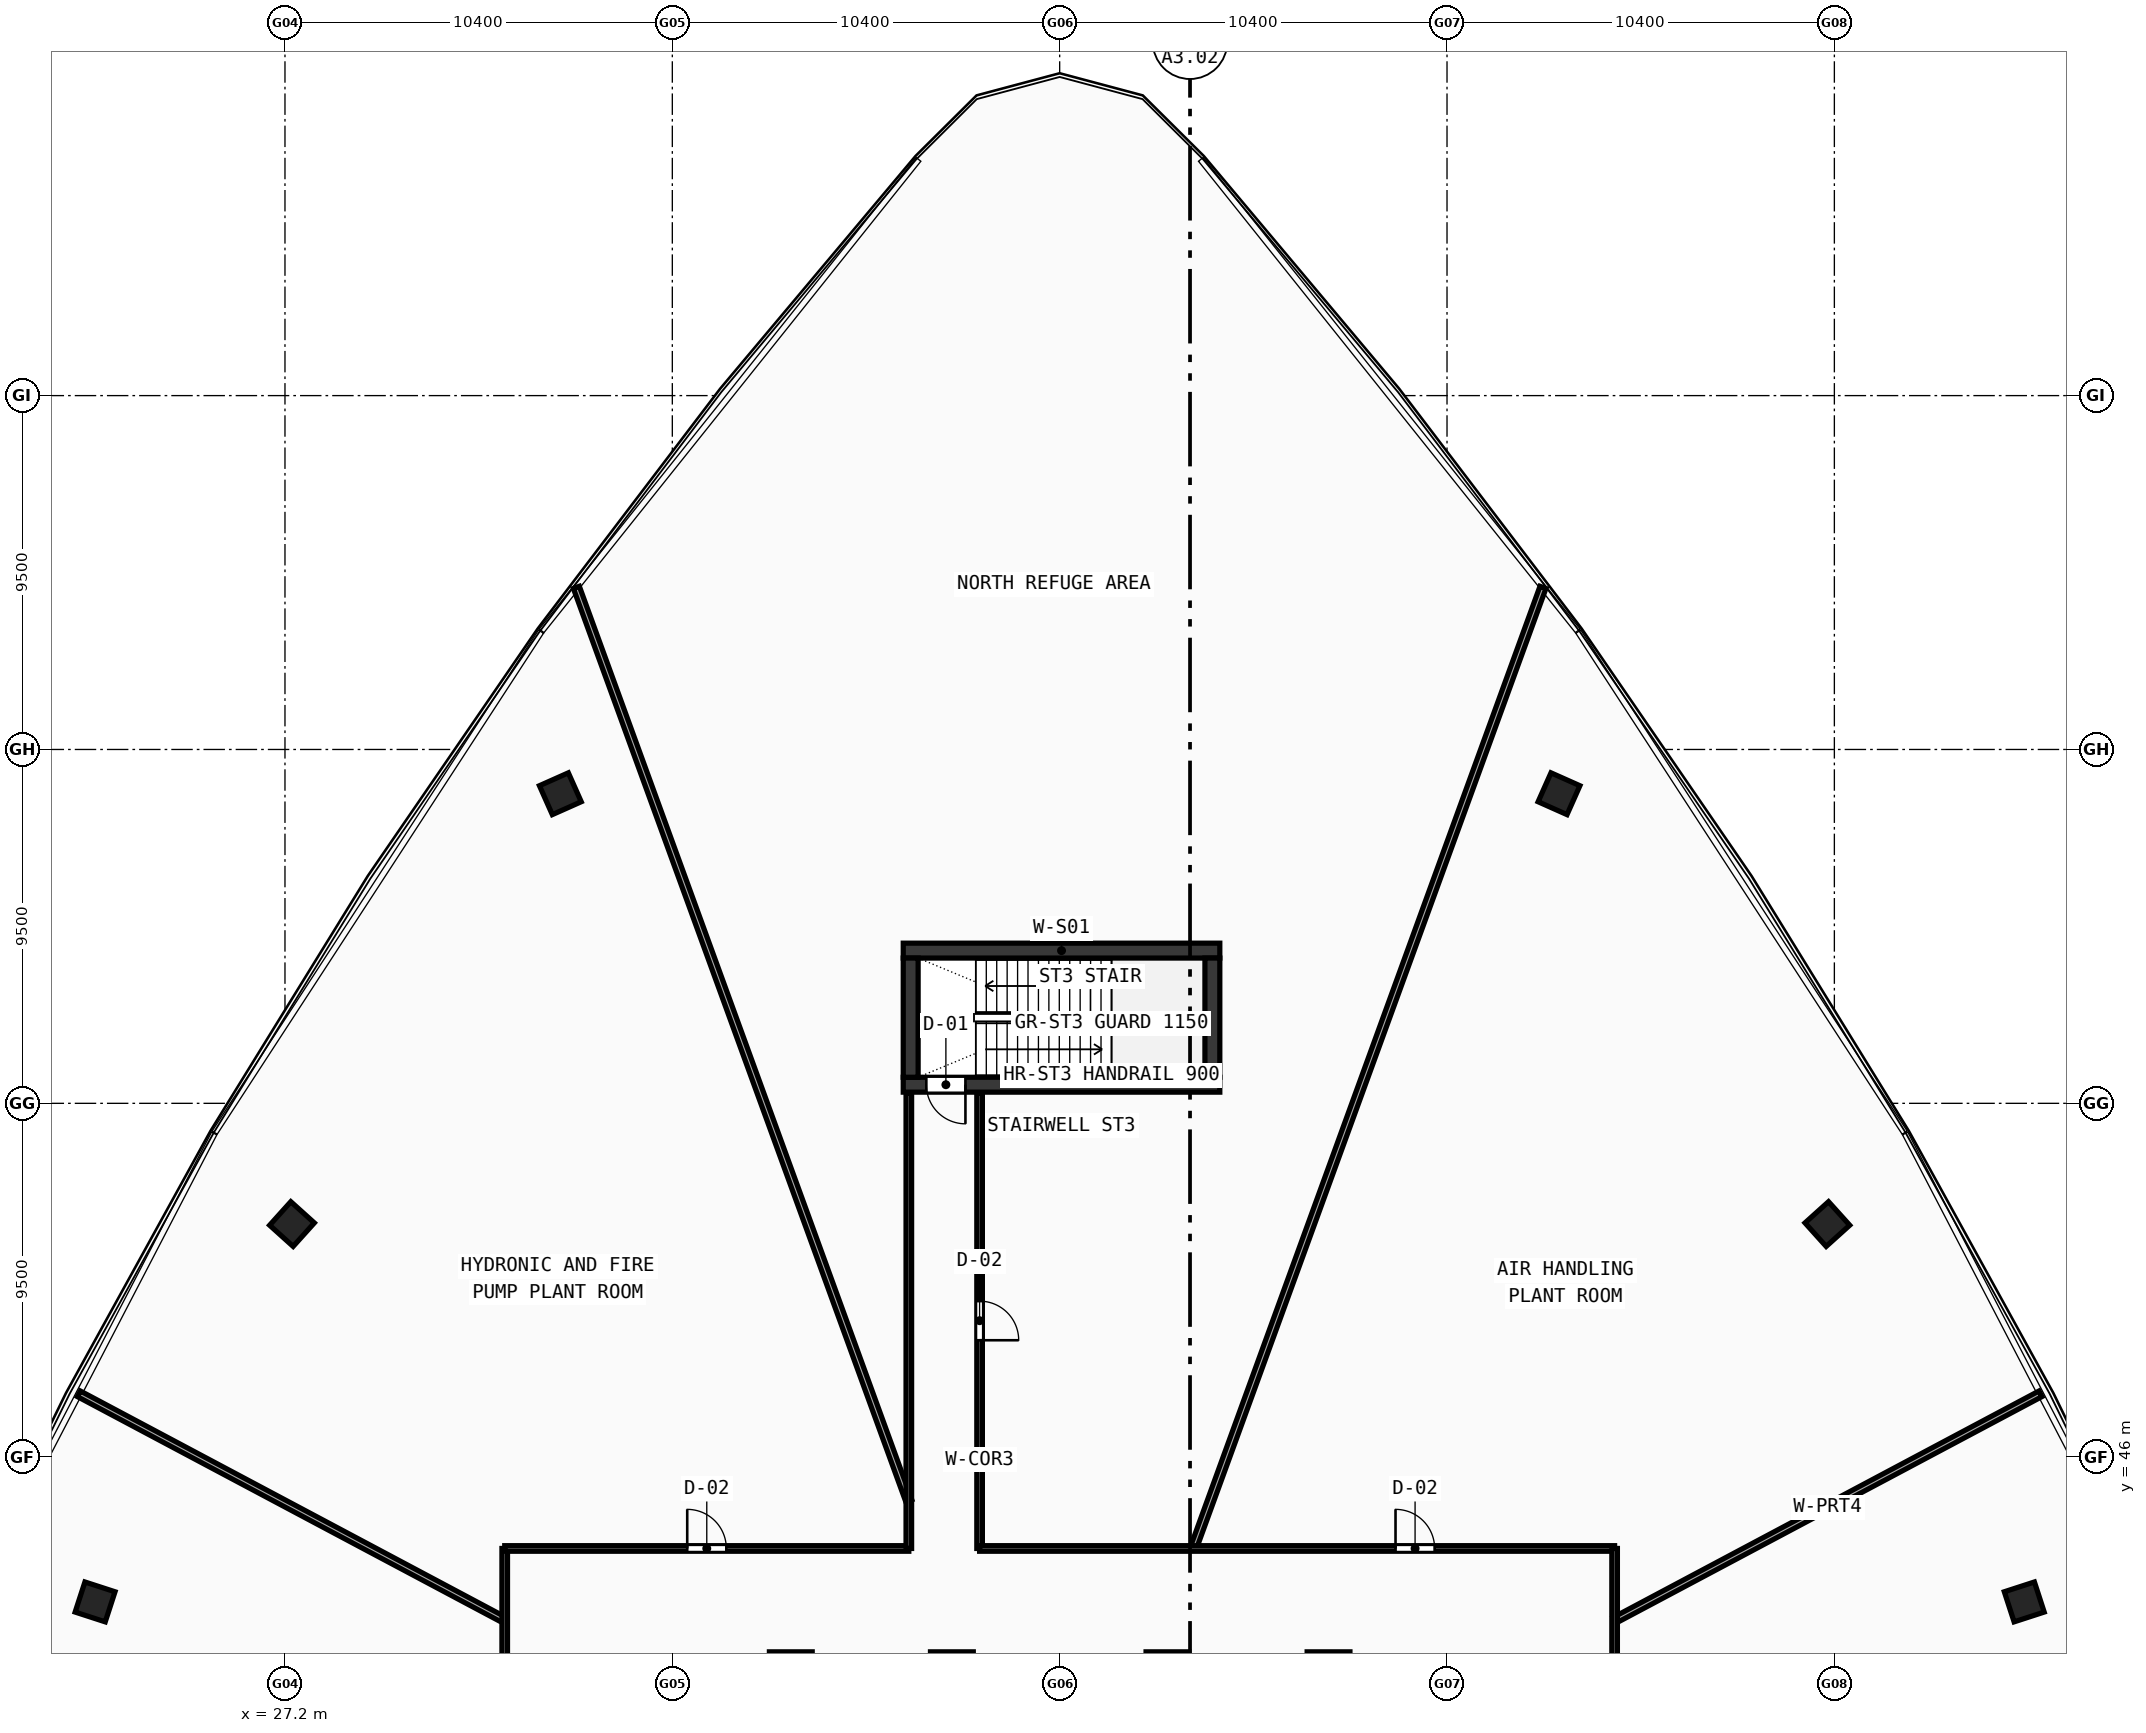
"""IFC4 building model, lengths in metres.
Left out: names, types, materials, properties, quantities, classifications, styles, units other than length and angle.
Written with IfcOpenShell. Run it as: python <this file> out.ifc"""

import sys

from ifc_helpers import new_model, si_unit, direction, frame, frame_2d, origin, origin_with_axes, origin_2d, place, context, subcontext, project, spatial, rectangle, hollow_rectangle, extrude, source, transform, mapped, element, fill, save


model = new_model("IFC4")
c1 = context("Model", 3, precision=1e-05, world=origin(), true_north=direction((0.0, 1.0)))
c2 = subcontext(c1, "Body", "Model", "MODEL_VIEW")
j1 = project(units=[si_unit("LENGTHUNIT", "METRE"), si_unit("PLANEANGLEUNIT", "RADIAN")], contexts=[c1])
p1 = place(None, origin())
s1 = spatial("IfcSite", under=j1, at=p1, CompositionType="ELEMENT")
p2 = place(p1, origin())
s2 = spatial("IfcBuilding", under=s1, at=p2, CompositionType="ELEMENT")
p3 = place(p2, frame((0.0, 0.0, 224.81)))
s3 = spatial("IfcBuildingStorey", under=s2, at=p3, CompositionType="ELEMENT", Elevation=224.81)
p4 = place(p3, frame((43.8, 59.6, 0.0), z_axis=(0.0, 0.0, 1.0), x_axis=(1.0, 0.0, 0.0)))
e1 = element("IfcWall", 1, at=p4, inside=s3, PredefinedType="SHEAR", context=c2, shape_type="SweptSolid", body=[
    extrude(rectangle(XDim=8.5, YDim=0.4, at=frame_2d((4.25, 0.0))), origin(), (0.0, 0.0, 1.0), 4.54),
])
p5 = place(p3, frame((43.8, 56.0, 0.0), z_axis=(0.0, 0.0, 1.0), x_axis=(1.0, 0.0, 0.0)))
e2 = element("IfcWall", 2, at=p5, inside=s3, PredefinedType="SHEAR", context=c2, shape_type="SweptSolid", body=[
    extrude(rectangle(XDim=8.5, YDim=0.4, at=frame_2d((4.25, 0.0))), origin(), (0.0, 0.0, 1.0), 4.54),
])
p6 = place(p5, frame((0.62, 0.0, 0.0)))
e3 = element("IfcOpeningElement", 3, at=p6, cuts=e2, PredefinedType="OPENING", context=c2, shape_type="SweptSolid", body=[
    extrude(rectangle(XDim=1.05, YDim=2.1, at=frame_2d((0.525, 1.05))), frame((0.0, 0.21, 0.0), z_axis=(0.0, -1.0, 0.0), x_axis=(1.0, 0.0, 0.0)), (0.0, 0.0, 1.0), 0.42),
])
for number, where, z_axis, x_axis in (
    (4, (44.0, 56.2, 0.0), (0.0, 0.0, 1.0), (0.0, 1.0, 0.0)),
    (5, (52.1, 56.2, 0.0), (0.0, 0.0, 1.0), (0.0, 1.0, 0.0)),
):
    element("IfcWall", number, at=place(p3, frame(where, z_axis=z_axis, x_axis=x_axis)), inside=s3, PredefinedType="SHEAR", context=c2, shape_type="SweptSolid", body=[
        extrude(rectangle(XDim=3.2, YDim=0.4, at=frame_2d((1.6, 0.0))), origin(), (0.0, 0.0, 1.0), 4.54),
    ])
m1 = source(origin(), c2, "Body", "SweptSolid", [
    extrude(hollow_rectangle(XDim=1.15, YDim=1.15, WallThickness=0.048, at=origin_2d()), origin(), (0.0, 0.0, 1.0), 4.82),
])
for number, where, z_axis, x_axis in (
    (6, (55.219, 40.2, -0.28), (0.0, 0.0, 1.0), (1.0, 0.0, 0.0)),
    (7, (50.894, 40.2, -0.28), (0.0, 0.0, 1.0), (1.0, 0.0, 0.0)),
    (8, (45.106, 40.2, -0.28), (0.0, 0.0, 1.0), (1.0, 0.0, 0.0)),
    (9, (40.781, 40.2, -0.28), (0.0, 0.0, 1.0), (1.0, 0.0, 0.0)),
):
    element("IfcColumn", number, at=place(p3, frame(where, z_axis=z_axis, x_axis=x_axis)), inside=s3, PredefinedType="COLUMN", context=c2, shape_type="MappedRepresentation", body=[
        mapped(m1, transform((0.0, 0.0, 0.0), scale=1.0)),
    ])
m2 = source(origin(), c2, "Body", "SweptSolid", [
    extrude(hollow_rectangle(XDim=0.85, YDim=0.85, WallThickness=0.034, at=origin_2d()), origin(), (0.0, 0.0, 1.0), 4.82),
])
for number, where, z_axis, x_axis in (
    (10, (73.899, 42.115, -0.28), (0.0, 0.0, 1.0), (-0.309, 0.951, 0.0)),
    (11, (68.612, 52.259, -0.28), (0.0, 0.0, 1.0), (-0.669, 0.743, 0.0)),
    (12, (61.407, 63.812, -0.28), (0.0, 0.0, 1.0), (-0.914, 0.407, 0.0)),
    (13, (34.593, 63.812, -0.28), (0.0, 0.0, 1.0), (-0.914, -0.407, 0.0)),
    (14, (27.388, 52.259, -0.28), (0.0, 0.0, 1.0), (-0.669, -0.743, 0.0)),
    (15, (22.102, 42.115, -0.28), (0.0, 0.0, 1.0), (-0.309, -0.951, 0.0)),
):
    element("IfcColumn", number, at=place(p3, frame(where, z_axis=z_axis, x_axis=x_axis)), inside=s3, PredefinedType="COLUMN", context=c2, shape_type="MappedRepresentation", body=[
        mapped(m2, transform((0.0, 0.0, 0.0), scale=1.0)),
    ])
p7 = place(p3, frame((62.9, 41.623, 0.0), z_axis=(0.0, 0.0, 1.0), x_axis=(0.88294771871, 0.469471326093, 0.0)))
e16 = element("IfcWall", 16, at=p7, inside=s3, PredefinedType="PARTITIONING", context=c2, shape_type="SweptSolid", body=[
    extrude(rectangle(XDim=12.949, YDim=0.17, at=frame_2d((6.475, 0.0))), origin(), (0.0, 0.0, 1.0), 3.89),
])
p8 = place(p3, frame((51.585, 43.55, 0.0), z_axis=(0.0, 0.0, 1.0), x_axis=(0.342012903323, 0.9396952559, 0.0)))
e17 = element("IfcWall", 17, at=p8, inside=s3, PredefinedType="PARTITIONING", context=c2, shape_type="SweptSolid", body=[
    extrude(rectangle(XDim=27.458, YDim=0.17, at=frame_2d((13.729, 0.0))), origin(), (0.0, 0.0, 1.0), 3.89),
])
p9 = place(p3, frame((43.95, 44.827, 0.0), z_axis=(0.0, 0.0, 1.0), x_axis=(-0.342014940405, 0.939694514478, 0.0)))
e18 = element("IfcWall", 18, at=p9, inside=s3, PredefinedType="PARTITIONING", context=c2, shape_type="SweptSolid", body=[
    extrude(rectangle(XDim=26.099, YDim=0.17, at=frame_2d((13.05, 0.0))), origin(), (0.0, 0.0, 1.0), 3.89),
])
p10 = place(p3, frame((33.1, 41.623, 0.0), z_axis=(0.0, 0.0, 1.0), x_axis=(-0.88294771871, 0.469471326093, 0.0)))
e19 = element("IfcWall", 19, at=p10, inside=s3, PredefinedType="PARTITIONING", context=c2, shape_type="SweptSolid", body=[
    extrude(rectangle(XDim=12.949, YDim=0.17, at=frame_2d((6.475, 0.0))), origin(), (0.0, 0.0, 1.0), 3.89),
])
p11 = place(p3, frame((45.85, 55.78, 0.0), z_axis=(0.0, 0.0, 1.0), x_axis=(0.0, -1.0, 0.0)))
e20 = element("IfcWall", 20, at=p11, inside=s3, PredefinedType="PARTITIONING", context=c2, shape_type="SweptSolid", body=[
    extrude(rectangle(XDim=12.23, YDim=0.15, at=frame_2d((6.115, 0.0))), origin(), (0.0, 0.0, 1.0), 4.19),
])
p12 = place(p11, frame((5.59, 0.0, 0.0)))
e21 = element("IfcOpeningElement", 21, at=p12, cuts=e20, PredefinedType="OPENING", context=c2, shape_type="SweptSolid", body=[
    extrude(rectangle(XDim=1.05, YDim=2.1, at=frame_2d((0.525, 1.05))), frame((0.0, 0.085, 0.0), z_axis=(0.0, -1.0, 0.0), x_axis=(1.0, 0.0, 0.0)), (0.0, 0.0, 1.0), 0.17),
])
p13 = place(p3, frame((45.85, 43.55, 0.0), z_axis=(0.0, 0.0, 1.0), x_axis=(1.0, 0.0, 0.0)))
e22 = element("IfcWall", 22, at=p13, inside=s3, PredefinedType="PARTITIONING", context=c2, shape_type="SweptSolid", body=[
    extrude(rectangle(XDim=17.05, YDim=0.15, at=frame_2d((8.525, 0.0))), origin(), (0.0, 0.0, 1.0), 3.89),
])
p14 = place(p13, frame((11.167, 0.0, 0.0)))
e23 = element("IfcOpeningElement", 23, at=p14, cuts=e22, PredefinedType="OPENING", context=c2, shape_type="SweptSolid", body=[
    extrude(rectangle(XDim=1.05, YDim=2.1, at=frame_2d((0.525, 1.05))), frame((0.0, 0.085, 0.0), z_axis=(0.0, -1.0, 0.0), x_axis=(1.0, 0.0, 0.0)), (0.0, 0.0, 1.0), 0.17),
])
p15 = place(p3, frame((62.9, 43.55, 0.0), z_axis=(0.0, 0.0, 1.0), x_axis=(0.0, -1.0, 0.0)))
e24 = element("IfcWall", 24, at=p15, inside=s3, PredefinedType="PARTITIONING", context=c2, shape_type="SweptSolid", body=[
    extrude(rectangle(XDim=18.65, YDim=0.15, at=frame_2d((9.325, 0.0))), origin(), (0.0, 0.0, 1.0), 3.89),
])
p16 = place(p15, frame((10.064, 0.0, 0.0)))
e25 = element("IfcOpeningElement", 25, at=p16, cuts=e24, PredefinedType="OPENING", context=c2, shape_type="SweptSolid", body=[
    extrude(rectangle(XDim=1.05, YDim=2.1, at=frame_2d((0.525, 1.05))), frame((0.0, 0.085, 0.0), z_axis=(0.0, -1.0, 0.0), x_axis=(1.0, 0.0, 0.0)), (0.0, 0.0, 1.0), 0.17),
])
p17 = place(p3, frame((33.1, 24.9, 0.0), z_axis=(0.0, 0.0, 1.0), x_axis=(0.0, 1.0, 0.0)))
e26 = element("IfcWall", 26, at=p17, inside=s3, PredefinedType="PARTITIONING", context=c2, shape_type="SweptSolid", body=[
    extrude(rectangle(XDim=18.65, YDim=0.15, at=frame_2d((9.325, 0.0))), origin(), (0.0, 0.0, 1.0), 3.89),
])
p18 = place(p17, frame((7.536, 0.0, 0.0)))
e27 = element("IfcOpeningElement", 27, at=p18, cuts=e26, PredefinedType="OPENING", context=c2, shape_type="SweptSolid", body=[
    extrude(rectangle(XDim=1.05, YDim=2.1, at=frame_2d((0.525, 1.05))), frame((0.0, 0.085, 0.0), z_axis=(0.0, -1.0, 0.0), x_axis=(1.0, 0.0, 0.0)), (0.0, 0.0, 1.0), 0.17),
])
p19 = place(p3, frame((33.1, 43.55, 0.0), z_axis=(0.0, 0.0, 1.0), x_axis=(1.0, 0.0, 0.0)))
e28 = element("IfcWall", 28, at=p19, inside=s3, PredefinedType="PARTITIONING", context=c2, shape_type="SweptSolid", body=[
    extrude(rectangle(XDim=10.85, YDim=0.15, at=frame_2d((5.425, 0.0))), origin(), (0.0, 0.0, 1.0), 3.89),
])
p20 = place(p19, frame((4.9, 0.0, 0.0)))
e29 = element("IfcOpeningElement", 29, at=p20, cuts=e28, PredefinedType="OPENING", context=c2, shape_type="SweptSolid", body=[
    extrude(rectangle(XDim=1.05, YDim=2.1, at=frame_2d((0.525, 1.05))), frame((0.0, 0.085, 0.0), z_axis=(0.0, -1.0, 0.0), x_axis=(1.0, 0.0, 0.0)), (0.0, 0.0, 1.0), 0.17),
])
p21 = place(p3, frame((43.95, 43.55, 0.0), z_axis=(0.0, 0.0, 1.0), x_axis=(0.0, 1.0, 0.0)))
e30 = element("IfcWall", 30, at=p21, inside=s3, PredefinedType="PARTITIONING", context=c2, shape_type="SweptSolid", body=[
    extrude(rectangle(XDim=12.23, YDim=0.15, at=frame_2d((6.115, 0.0))), origin(), (0.0, 0.0, 1.0), 4.19),
])
m3 = source(origin(), c2, "Body", "SweptSolid", [
    extrude(rectangle(XDim=1.05, YDim=2.1, at=frame_2d((0.525, 1.05))), frame((0.0, 0.025, 0.0), z_axis=(0.0, -1.0, 0.0), x_axis=(1.0, 0.0, 0.0)), (0.0, 0.0, 1.0), 0.05),
])
p22 = place(p6, frame((1.05, 0.0, 0.0), z_axis=(0.0, 0.0, 1.0), x_axis=(-1.0, 0.0, 0.0)))
e31 = element("IfcDoor", 31, at=p22, inside=s3, OperationType="SINGLE_SWING_LEFT", PredefinedType="DOOR", context=c2, shape_type="MappedRepresentation", body=[
    mapped(m3, transform((0.0, 0.0, 0.0), scale=1.0)),
])
fill(e3, e31)
p23 = place(p14, origin_with_axes())
e32 = element("IfcDoor", 32, at=p23, inside=s3, OperationType="SINGLE_SWING_LEFT", PredefinedType="DOOR", context=c2, shape_type="MappedRepresentation", body=[
    mapped(m3, transform((0.0, 0.0, 0.0), scale=1.0)),
])
fill(e23, e32)
p24 = place(p12, origin_with_axes())
e33 = element("IfcDoor", 33, at=p24, inside=s3, OperationType="SINGLE_SWING_RIGHT", PredefinedType="DOOR", context=c2, shape_type="MappedRepresentation", body=[
    mapped(m3, transform((0.0, 0.0, 0.0), scale=1.0)),
])
fill(e21, e33)
p25 = place(p20, origin_with_axes())
e34 = element("IfcDoor", 34, at=p25, inside=s3, OperationType="SINGLE_SWING_LEFT", PredefinedType="DOOR", context=c2, shape_type="MappedRepresentation", body=[
    mapped(m3, transform((0.0, 0.0, 0.0), scale=1.0)),
])
fill(e29, e34)
save(model, sys.argv[1])
